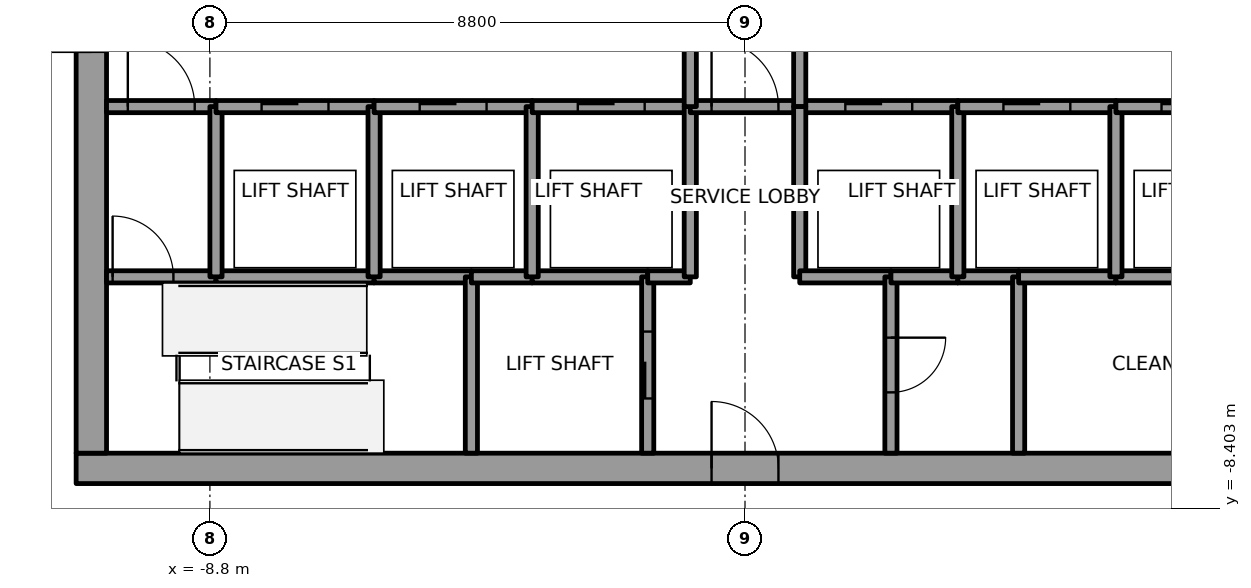
"""IFC4 building model, lengths in metres.
Left out: names, types, materials, properties, quantities, classifications, styles, units other than length and angle.
Written with IfcOpenShell. Run it as: python <this file> out.ifc"""

import sys

from ifc_helpers import new_model, si_unit, direction, frame, frame_2d, origin, place, context, subcontext, project, spatial, rectangle, extrude, element, fill, save


model = new_model("IFC4")
c1 = context("Model", 3, precision=1e-05, world=origin(), true_north=direction((0.0, 1.0)))
c2 = subcontext(c1, "Body", "Model", "MODEL_VIEW")
j1 = project(units=[si_unit("LENGTHUNIT", "METRE"), si_unit("PLANEANGLEUNIT", "RADIAN")], contexts=[c1])
p1 = place(None, origin())
s1 = spatial("IfcSite", under=j1, at=p1, CompositionType="ELEMENT")
p2 = place(p1, origin())
s2 = spatial("IfcBuilding", under=s1, at=p2, CompositionType="ELEMENT")
p3 = place(p2, frame((0.0, 0.0, 251.0)))
s3 = spatial("IfcBuildingStorey", under=s2, at=p3, CompositionType="ELEMENT", Elevation=251.0)
p4 = place(p3, frame((-11.0, -7.75, 0.0), z_axis=(0.0, 0.0, 1.0), x_axis=(1.0, 0.0, 0.0)))
e1 = element("IfcWall", 1, at=p4, inside=s3, PredefinedType="SHEAR", context=c2, shape_type="SweptSolid", body=[
    extrude(rectangle(XDim=22.0, YDim=0.5, at=frame_2d((11.0, 0.0))), origin(), (0.0, 0.0, 1.0), 4.0),
])
p5 = place(p4, frame((10.45, 0.0, 0.0)))
e2 = element("IfcOpeningElement", 2, at=p5, cuts=e1, PredefinedType="OPENING", context=c2, shape_type="SweptSolid", body=[
    extrude(rectangle(XDim=1.1, YDim=2.1, at=frame_2d((0.55, 1.05))), frame((0.0, 0.25, 0.0), z_axis=(0.0, -1.0, 0.0), x_axis=(1.0, 0.0, 0.0)), (0.0, 0.0, 1.0), 0.5),
])
p6 = place(p3, frame((-10.75, -7.5, 0.0), z_axis=(0.0, 0.0, 1.0), x_axis=(0.0, 1.0, 0.0)))
e3 = element("IfcWall", 3, at=p6, inside=s3, PredefinedType="SHEAR", context=c2, shape_type="SweptSolid", body=[
    extrude(rectangle(XDim=15.0, YDim=0.5, at=frame_2d((7.5, 0.0))), origin(), (0.0, 0.0, 1.0), 4.0),
])
p7 = place(p6, frame((6.6, 0.0, 0.0)))
e4 = element("IfcOpeningElement", 4, at=p7, cuts=e3, PredefinedType="OPENING", context=c2, shape_type="SweptSolid", body=[
    extrude(rectangle(XDim=1.8, YDim=2.1, at=frame_2d((0.9, 1.05))), frame((0.0, 0.25, 0.0), z_axis=(0.0, -1.0, 0.0), x_axis=(1.0, 0.0, 0.0)), (0.0, 0.0, 1.0), 0.5),
])
p8 = place(p3, frame((-10.5, -4.6, 0.0), z_axis=(0.0, 0.0, 1.0), x_axis=(1.0, 0.0, 0.0)))
e5 = element("IfcWall", 5, at=p8, inside=s3, PredefinedType="SOLIDWALL", context=c2, shape_type="SweptSolid", body=[
    extrude(rectangle(XDim=1.8, YDim=0.2, at=frame_2d((0.9, 0.0))), origin(), (0.0, 0.0, 1.0), 3.85),
])
p9 = place(p8, frame((0.1, 0.0, 0.0)))
e6 = element("IfcOpeningElement", 6, at=p9, cuts=e5, PredefinedType="OPENING", context=c2, shape_type="SweptSolid", body=[
    extrude(rectangle(XDim=1.0, YDim=2.1, at=frame_2d((0.5, 1.05))), frame((0.0, 0.1, 0.0), z_axis=(0.0, -1.0, 0.0), x_axis=(1.0, 0.0, 0.0)), (0.0, 0.0, 1.0), 0.2),
])
p10 = place(p3, frame((-10.5, -1.8, 0.0), z_axis=(0.0, 0.0, 1.0), x_axis=(1.0, 0.0, 0.0)))
e7 = element("IfcWall", 7, at=p10, inside=s3, PredefinedType="SOLIDWALL", context=c2, shape_type="SweptSolid", body=[
    extrude(rectangle(XDim=1.8, YDim=0.2, at=frame_2d((0.9, 0.0))), origin(), (0.0, 0.0, 1.0), 3.85),
])
p11 = place(p10, frame((0.35, 0.0, 0.0)))
e8 = element("IfcOpeningElement", 8, at=p11, cuts=e7, PredefinedType="OPENING", context=c2, shape_type="SweptSolid", body=[
    extrude(rectangle(XDim=1.1, YDim=2.1, at=frame_2d((0.55, 1.05))), frame((0.0, 0.1, 0.0), z_axis=(0.0, -1.0, 0.0), x_axis=(1.0, 0.0, 0.0)), (0.0, 0.0, 1.0), 0.2),
])
p12 = place(p3, frame((-8.7, -4.6, 0.0), z_axis=(0.0, 0.0, 1.0), x_axis=(1.0, 0.0, 0.0)))
e9 = element("IfcWall", 9, at=p12, inside=s3, PredefinedType="SOLIDWALL", context=c2, shape_type="SweptSolid", body=[
    extrude(rectangle(XDim=2.6, YDim=0.2, at=frame_2d((1.3, 0.0))), origin(), (0.0, 0.0, 1.0), 3.85),
])
p13 = place(p3, frame((-8.7, -4.6, 0.0), z_axis=(0.0, 0.0, 1.0), x_axis=(0.0, 1.0, 0.0)))
e10 = element("IfcWall", 10, at=p13, inside=s3, PredefinedType="SOLIDWALL", context=c2, shape_type="SweptSolid", body=[
    extrude(rectangle(XDim=2.8, YDim=0.2, at=frame_2d((1.4, 0.0))), origin(), (0.0, 0.0, 1.0), 3.85),
])
p14 = place(p3, frame((-8.7, -1.8, 0.0), z_axis=(0.0, 0.0, 1.0), x_axis=(1.0, 0.0, 0.0)))
e11 = element("IfcWall", 11, at=p14, inside=s3, PredefinedType="SOLIDWALL", context=c2, shape_type="SweptSolid", body=[
    extrude(rectangle(XDim=2.6, YDim=0.2, at=frame_2d((1.3, 0.0))), origin(), (0.0, 0.0, 1.0), 3.85),
])
p15 = place(p14, frame((0.75, 0.0, 0.0)))
e12 = element("IfcOpeningElement", 12, at=p15, cuts=e11, PredefinedType="OPENING", context=c2, shape_type="SweptSolid", body=[
    extrude(rectangle(XDim=1.1, YDim=2.1, at=frame_2d((0.55, 1.05))), frame((0.0, 0.1, 0.0), z_axis=(0.0, -1.0, 0.0), x_axis=(1.0, 0.0, 0.0)), (0.0, 0.0, 1.0), 0.2),
])
p16 = place(p3, frame((-6.1, -4.6, 0.0), z_axis=(0.0, 0.0, 1.0), x_axis=(1.0, 0.0, 0.0)))
e13 = element("IfcWall", 13, at=p16, inside=s3, PredefinedType="SOLIDWALL", context=c2, shape_type="SweptSolid", body=[
    extrude(rectangle(XDim=1.6, YDim=0.2, at=frame_2d((0.8, 0.0))), origin(), (0.0, 0.0, 1.0), 3.85),
])
p17 = place(p3, frame((-6.1, -4.6, 0.0), z_axis=(0.0, 0.0, 1.0), x_axis=(0.0, 1.0, 0.0)))
e14 = element("IfcWall", 14, at=p17, inside=s3, PredefinedType="SOLIDWALL", context=c2, shape_type="SweptSolid", body=[
    extrude(rectangle(XDim=2.8, YDim=0.2, at=frame_2d((1.4, 0.0))), origin(), (0.0, 0.0, 1.0), 3.85),
])
p18 = place(p3, frame((-6.1, -1.8, 0.0), z_axis=(0.0, 0.0, 1.0), x_axis=(1.0, 0.0, 0.0)))
e15 = element("IfcWall", 15, at=p18, inside=s3, PredefinedType="SOLIDWALL", context=c2, shape_type="SweptSolid", body=[
    extrude(rectangle(XDim=2.6, YDim=0.2, at=frame_2d((1.3, 0.0))), origin(), (0.0, 0.0, 1.0), 3.85),
])
p19 = place(p18, frame((0.75, 0.0, 0.0)))
e16 = element("IfcOpeningElement", 16, at=p19, cuts=e15, PredefinedType="OPENING", context=c2, shape_type="SweptSolid", body=[
    extrude(rectangle(XDim=1.1, YDim=2.1, at=frame_2d((0.55, 1.05))), frame((0.0, 0.1, 0.0), z_axis=(0.0, -1.0, 0.0), x_axis=(1.0, 0.0, 0.0)), (0.0, 0.0, 1.0), 0.2),
])
p20 = place(p3, frame((-4.5, -4.6, 0.0), z_axis=(0.0, 0.0, 1.0), x_axis=(0.0, -1.0, 0.0)))
e17 = element("IfcWall", 17, at=p20, inside=s3, PredefinedType="SOLIDWALL", context=c2, shape_type="SweptSolid", body=[
    extrude(rectangle(XDim=2.9, YDim=0.2, at=frame_2d((1.45, 0.0))), origin(), (0.0, 0.0, 1.0), 3.85),
])
p21 = place(p3, frame((-4.5, -4.6, 0.0), z_axis=(0.0, 0.0, 1.0), x_axis=(1.0, 0.0, 0.0)))
e18 = element("IfcWall", 18, at=p21, inside=s3, PredefinedType="SOLIDWALL", context=c2, shape_type="SweptSolid", body=[
    extrude(rectangle(XDim=1.0, YDim=0.2, at=frame_2d((0.5, 0.0))), origin(), (0.0, 0.0, 1.0), 3.85),
])
p22 = place(p3, frame((-3.5, -4.6, 0.0), z_axis=(0.0, 0.0, 1.0), x_axis=(1.0, 0.0, 0.0)))
e19 = element("IfcWall", 19, at=p22, inside=s3, PredefinedType="SOLIDWALL", context=c2, shape_type="SweptSolid", body=[
    extrude(rectangle(XDim=1.9, YDim=0.2, at=frame_2d((0.95, 0.0))), origin(), (0.0, 0.0, 1.0), 3.85),
])
p23 = place(p3, frame((-3.5, -4.6, 0.0), z_axis=(0.0, 0.0, 1.0), x_axis=(0.0, 1.0, 0.0)))
e20 = element("IfcWall", 20, at=p23, inside=s3, PredefinedType="SOLIDWALL", context=c2, shape_type="SweptSolid", body=[
    extrude(rectangle(XDim=2.8, YDim=0.2, at=frame_2d((1.4, 0.0))), origin(), (0.0, 0.0, 1.0), 3.85),
])
p24 = place(p3, frame((-3.5, -1.8, 0.0), z_axis=(0.0, 0.0, 1.0), x_axis=(1.0, 0.0, 0.0)))
e21 = element("IfcWall", 21, at=p24, inside=s3, PredefinedType="SOLIDWALL", context=c2, shape_type="SweptSolid", body=[
    extrude(rectangle(XDim=2.6, YDim=0.2, at=frame_2d((1.3, 0.0))), origin(), (0.0, 0.0, 1.0), 3.85),
])
p25 = place(p24, frame((0.75, 0.0, 0.0)))
e22 = element("IfcOpeningElement", 22, at=p25, cuts=e21, PredefinedType="OPENING", context=c2, shape_type="SweptSolid", body=[
    extrude(rectangle(XDim=1.1, YDim=2.1, at=frame_2d((0.55, 1.05))), frame((0.0, 0.1, 0.0), z_axis=(0.0, -1.0, 0.0), x_axis=(1.0, 0.0, 0.0)), (0.0, 0.0, 1.0), 0.2),
])
p26 = place(p3, frame((-1.6, -7.5, 0.0), z_axis=(0.0, 0.0, 1.0), x_axis=(0.0, 1.0, 0.0)))
e23 = element("IfcWall", 23, at=p26, inside=s3, PredefinedType="SOLIDWALL", context=c2, shape_type="SweptSolid", body=[
    extrude(rectangle(XDim=2.9, YDim=0.2, at=frame_2d((1.45, 0.0))), origin(), (0.0, 0.0, 1.0), 3.85),
])
p27 = place(p26, frame((0.9, 0.0, 0.0)))
e24 = element("IfcOpeningElement", 24, at=p27, cuts=e23, PredefinedType="OPENING", context=c2, shape_type="SweptSolid", body=[
    extrude(rectangle(XDim=1.1, YDim=2.1, at=frame_2d((0.55, 1.05))), frame((0.0, 0.1, 0.0), z_axis=(0.0, -1.0, 0.0), x_axis=(1.0, 0.0, 0.0)), (0.0, 0.0, 1.0), 0.2),
])
p28 = place(p3, frame((-1.6, -4.6, 0.0), z_axis=(0.0, 0.0, 1.0), x_axis=(1.0, 0.0, 0.0)))
e25 = element("IfcWall", 25, at=p28, inside=s3, PredefinedType="SOLIDWALL", context=c2, shape_type="SweptSolid", body=[
    extrude(rectangle(XDim=0.7, YDim=0.2, at=frame_2d((0.35, 0.0))), origin(), (0.0, 0.0, 1.0), 3.85),
])
p29 = place(p3, frame((-0.9, -4.6, 0.0), z_axis=(0.0, 0.0, 1.0), x_axis=(0.0, 1.0, 0.0)))
e26 = element("IfcWall", 26, at=p29, inside=s3, PredefinedType="SOLIDWALL", context=c2, shape_type="SweptSolid", body=[
    extrude(rectangle(XDim=2.8, YDim=0.2, at=frame_2d((1.4, 0.0))), origin(), (0.0, 0.0, 1.0), 3.85),
])
p30 = place(p3, frame((-0.9, -1.8, 0.0), z_axis=(0.0, 0.0, 1.0), x_axis=(1.0, 0.0, 0.0)))
e27 = element("IfcWall", 27, at=p30, inside=s3, PredefinedType="SOLIDWALL", context=c2, shape_type="SweptSolid", body=[
    extrude(rectangle(XDim=1.8, YDim=0.2, at=frame_2d((0.9, 0.0))), origin(), (0.0, 0.0, 1.0), 3.85),
])
p31 = place(p30, frame((0.35, 0.0, 0.0)))
e28 = element("IfcOpeningElement", 28, at=p31, cuts=e27, PredefinedType="OPENING", context=c2, shape_type="SweptSolid", body=[
    extrude(rectangle(XDim=1.1, YDim=2.1, at=frame_2d((0.55, 1.05))), frame((0.0, 0.1, 0.0), z_axis=(0.0, -1.0, 0.0), x_axis=(1.0, 0.0, 0.0)), (0.0, 0.0, 1.0), 0.2),
])
p32 = place(p3, frame((-0.9, 1.8, 0.0), z_axis=(0.0, 0.0, 1.0), x_axis=(0.0, -1.0, 0.0)))
e29 = element("IfcWall", 29, at=p32, inside=s3, PredefinedType="SOLIDWALL", context=c2, shape_type="SweptSolid", body=[
    extrude(rectangle(XDim=3.6, YDim=0.2, at=frame_2d((1.8, 0.0))), origin(), (0.0, 0.0, 1.0), 3.85),
])
p33 = place(p32, frame((1.05, 0.0, 0.0)))
e30 = element("IfcOpeningElement", 30, at=p33, cuts=e29, PredefinedType="OPENING", context=c2, shape_type="SweptSolid", body=[
    extrude(rectangle(XDim=1.5, YDim=2.1, at=frame_2d((0.75, 1.05))), frame((0.0, 0.1, 0.0), z_axis=(0.0, -1.0, 0.0), x_axis=(1.0, 0.0, 0.0)), (0.0, 0.0, 1.0), 0.2),
])
p34 = place(p3, frame((0.9, -1.8, 0.0), z_axis=(0.0, 0.0, 1.0), x_axis=(1.0, 0.0, 0.0)))
e31 = element("IfcWall", 31, at=p34, inside=s3, PredefinedType="SOLIDWALL", context=c2, shape_type="SweptSolid", body=[
    extrude(rectangle(XDim=2.6, YDim=0.2, at=frame_2d((1.3, 0.0))), origin(), (0.0, 0.0, 1.0), 3.85),
])
p35 = place(p34, frame((0.75, 0.0, 0.0)))
e32 = element("IfcOpeningElement", 32, at=p35, cuts=e31, PredefinedType="OPENING", context=c2, shape_type="SweptSolid", body=[
    extrude(rectangle(XDim=1.1, YDim=2.1, at=frame_2d((0.55, 1.05))), frame((0.0, 0.1, 0.0), z_axis=(0.0, -1.0, 0.0), x_axis=(1.0, 0.0, 0.0)), (0.0, 0.0, 1.0), 0.2),
])
p36 = place(p3, frame((0.9, -1.8, 0.0), z_axis=(0.0, 0.0, 1.0), x_axis=(0.0, 1.0, 0.0)))
e33 = element("IfcWall", 33, at=p36, inside=s3, PredefinedType="SOLIDWALL", context=c2, shape_type="SweptSolid", body=[
    extrude(rectangle(XDim=3.6, YDim=0.2, at=frame_2d((1.8, 0.0))), origin(), (0.0, 0.0, 1.0), 3.85),
])
p37 = place(p36, frame((1.05, 0.0, 0.0)))
e34 = element("IfcOpeningElement", 34, at=p37, cuts=e33, PredefinedType="OPENING", context=c2, shape_type="SweptSolid", body=[
    extrude(rectangle(XDim=1.5, YDim=2.1, at=frame_2d((0.75, 1.05))), frame((0.0, 0.1, 0.0), z_axis=(0.0, -1.0, 0.0), x_axis=(1.0, 0.0, 0.0)), (0.0, 0.0, 1.0), 0.2),
])
p38 = place(p3, frame((0.9, -1.8, 0.0), z_axis=(0.0, 0.0, 1.0), x_axis=(0.0, -1.0, 0.0)))
e35 = element("IfcWall", 35, at=p38, inside=s3, PredefinedType="SOLIDWALL", context=c2, shape_type="SweptSolid", body=[
    extrude(rectangle(XDim=2.8, YDim=0.2, at=frame_2d((1.4, 0.0))), origin(), (0.0, 0.0, 1.0), 3.85),
])
p39 = place(p3, frame((0.9, -4.6, 0.0), z_axis=(0.0, 0.0, 1.0), x_axis=(1.0, 0.0, 0.0)))
e36 = element("IfcWall", 36, at=p39, inside=s3, PredefinedType="SOLIDWALL", context=c2, shape_type="SweptSolid", body=[
    extrude(rectangle(XDim=1.5, YDim=0.2, at=frame_2d((0.75, 0.0))), origin(), (0.0, 0.0, 1.0), 3.85),
])
p40 = place(p3, frame((2.4, -4.6, 0.0), z_axis=(0.0, 0.0, 1.0), x_axis=(0.0, -1.0, 0.0)))
e37 = element("IfcWall", 37, at=p40, inside=s3, PredefinedType="SOLIDWALL", context=c2, shape_type="SweptSolid", body=[
    extrude(rectangle(XDim=2.9, YDim=0.2, at=frame_2d((1.45, 0.0))), origin(), (0.0, 0.0, 1.0), 3.85),
])
p41 = place(p40, frame((1.0, 0.0, 0.0)))
e38 = element("IfcOpeningElement", 38, at=p41, cuts=e37, PredefinedType="OPENING", context=c2, shape_type="SweptSolid", body=[
    extrude(rectangle(XDim=0.9, YDim=2.1, at=frame_2d((0.45, 1.05))), frame((0.0, 0.1, 0.0), z_axis=(0.0, -1.0, 0.0), x_axis=(1.0, 0.0, 0.0)), (0.0, 0.0, 1.0), 0.2),
])
p42 = place(p3, frame((3.5, -4.6, 0.0), z_axis=(0.0, 0.0, 1.0), x_axis=(-1.0, 0.0, 0.0)))
e39 = element("IfcWall", 39, at=p42, inside=s3, PredefinedType="SOLIDWALL", context=c2, shape_type="SweptSolid", body=[
    extrude(rectangle(XDim=1.1, YDim=0.2, at=frame_2d((0.55, 0.0))), origin(), (0.0, 0.0, 1.0), 3.85),
])
p43 = place(p3, frame((4.5, -4.6, 0.0), z_axis=(0.0, 0.0, 1.0), x_axis=(-1.0, 0.0, 0.0)))
e40 = element("IfcWall", 40, at=p43, inside=s3, PredefinedType="SOLIDWALL", context=c2, shape_type="SweptSolid", body=[
    extrude(rectangle(XDim=1.0, YDim=0.2, at=frame_2d((0.5, 0.0))), origin(), (0.0, 0.0, 1.0), 3.85),
])
p44 = place(p3, frame((3.5, -4.6, 0.0), z_axis=(0.0, 0.0, 1.0), x_axis=(0.0, 1.0, 0.0)))
e41 = element("IfcWall", 41, at=p44, inside=s3, PredefinedType="SOLIDWALL", context=c2, shape_type="SweptSolid", body=[
    extrude(rectangle(XDim=2.8, YDim=0.2, at=frame_2d((1.4, 0.0))), origin(), (0.0, 0.0, 1.0), 3.85),
])
p45 = place(p3, frame((3.5, -1.8, 0.0), z_axis=(0.0, 0.0, 1.0), x_axis=(1.0, 0.0, 0.0)))
e42 = element("IfcWall", 42, at=p45, inside=s3, PredefinedType="SOLIDWALL", context=c2, shape_type="SweptSolid", body=[
    extrude(rectangle(XDim=2.6, YDim=0.2, at=frame_2d((1.3, 0.0))), origin(), (0.0, 0.0, 1.0), 3.85),
])
p46 = place(p45, frame((0.75, 0.0, 0.0)))
e43 = element("IfcOpeningElement", 43, at=p46, cuts=e42, PredefinedType="OPENING", context=c2, shape_type="SweptSolid", body=[
    extrude(rectangle(XDim=1.1, YDim=2.1, at=frame_2d((0.55, 1.05))), frame((0.0, 0.1, 0.0), z_axis=(0.0, -1.0, 0.0), x_axis=(1.0, 0.0, 0.0)), (0.0, 0.0, 1.0), 0.2),
])
p47 = place(p3, frame((4.5, -4.6, 0.0), z_axis=(0.0, 0.0, 1.0), x_axis=(0.0, -1.0, 0.0)))
e44 = element("IfcWall", 44, at=p47, inside=s3, PredefinedType="SOLIDWALL", context=c2, shape_type="SweptSolid", body=[
    extrude(rectangle(XDim=2.9, YDim=0.2, at=frame_2d((1.45, 0.0))), origin(), (0.0, 0.0, 1.0), 3.85),
])
p48 = place(p3, frame((6.1, -4.6, 0.0), z_axis=(0.0, 0.0, 1.0), x_axis=(-1.0, 0.0, 0.0)))
e45 = element("IfcWall", 45, at=p48, inside=s3, PredefinedType="SOLIDWALL", context=c2, shape_type="SweptSolid", body=[
    extrude(rectangle(XDim=1.6, YDim=0.2, at=frame_2d((0.8, 0.0))), origin(), (0.0, 0.0, 1.0), 3.85),
])
p49 = place(p3, frame((8.7, -4.6, 0.0), z_axis=(0.0, 0.0, 1.0), x_axis=(-1.0, 0.0, 0.0)))
e46 = element("IfcWall", 46, at=p49, inside=s3, PredefinedType="SOLIDWALL", context=c2, shape_type="SweptSolid", body=[
    extrude(rectangle(XDim=2.6, YDim=0.2, at=frame_2d((1.3, 0.0))), origin(), (0.0, 0.0, 1.0), 3.85),
])
p50 = place(p3, frame((6.1, -4.6, 0.0), z_axis=(0.0, 0.0, 1.0), x_axis=(0.0, 1.0, 0.0)))
e47 = element("IfcWall", 47, at=p50, inside=s3, PredefinedType="SOLIDWALL", context=c2, shape_type="SweptSolid", body=[
    extrude(rectangle(XDim=2.8, YDim=0.2, at=frame_2d((1.4, 0.0))), origin(), (0.0, 0.0, 1.0), 3.85),
])
p51 = place(p3, frame((6.1, -1.8, 0.0), z_axis=(0.0, 0.0, 1.0), x_axis=(1.0, 0.0, 0.0)))
e48 = element("IfcWall", 48, at=p51, inside=s3, PredefinedType="SOLIDWALL", context=c2, shape_type="SweptSolid", body=[
    extrude(rectangle(XDim=2.6, YDim=0.2, at=frame_2d((1.3, 0.0))), origin(), (0.0, 0.0, 1.0), 3.85),
])
p52 = place(p51, frame((0.75, 0.0, 0.0)))
e49 = element("IfcOpeningElement", 49, at=p52, cuts=e48, PredefinedType="OPENING", context=c2, shape_type="SweptSolid", body=[
    extrude(rectangle(XDim=1.1, YDim=2.1, at=frame_2d((0.55, 1.05))), frame((0.0, 0.1, 0.0), z_axis=(0.0, -1.0, 0.0), x_axis=(1.0, 0.0, 0.0)), (0.0, 0.0, 1.0), 0.2),
])
p53 = place(p15, origin())
e50 = element("IfcDoor", 50, at=p53, inside=s3, OperationType="SLIDING_TO_RIGHT", PredefinedType="DOOR", context=c2, shape_type="SweptSolid", body=[
    extrude(rectangle(XDim=1.1, YDim=2.1, at=frame_2d((0.55, 1.05))), frame((0.0, 0.025, 0.0), z_axis=(0.0, -1.0, 0.0), x_axis=(1.0, 0.0, 0.0)), (0.0, 0.0, 1.0), 0.05),
])
fill(e12, e50)
p54 = place(p19, origin())
e51 = element("IfcDoor", 51, at=p54, inside=s3, OperationType="SLIDING_TO_LEFT", PredefinedType="DOOR", context=c2, shape_type="SweptSolid", body=[
    extrude(rectangle(XDim=1.1, YDim=2.1, at=frame_2d((0.55, 1.05))), frame((0.0, 0.025, 0.0), z_axis=(0.0, -1.0, 0.0), x_axis=(1.0, 0.0, 0.0)), (0.0, 0.0, 1.0), 0.05),
])
fill(e16, e51)
p55 = place(p25, origin())
e52 = element("IfcDoor", 52, at=p55, inside=s3, OperationType="SLIDING_TO_LEFT", PredefinedType="DOOR", context=c2, shape_type="SweptSolid", body=[
    extrude(rectangle(XDim=1.1, YDim=2.1, at=frame_2d((0.55, 1.05))), frame((0.0, 0.025, 0.0), z_axis=(0.0, -1.0, 0.0), x_axis=(1.0, 0.0, 0.0)), (0.0, 0.0, 1.0), 0.05),
])
fill(e22, e52)
p56 = place(p35, origin())
e53 = element("IfcDoor", 53, at=p56, inside=s3, OperationType="SLIDING_TO_RIGHT", PredefinedType="DOOR", context=c2, shape_type="SweptSolid", body=[
    extrude(rectangle(XDim=1.1, YDim=2.1, at=frame_2d((0.55, 1.05))), frame((0.0, 0.025, 0.0), z_axis=(0.0, -1.0, 0.0), x_axis=(1.0, 0.0, 0.0)), (0.0, 0.0, 1.0), 0.05),
])
fill(e32, e53)
p57 = place(p46, origin())
e54 = element("IfcDoor", 54, at=p57, inside=s3, OperationType="SLIDING_TO_LEFT", PredefinedType="DOOR", context=c2, shape_type="SweptSolid", body=[
    extrude(rectangle(XDim=1.1, YDim=2.1, at=frame_2d((0.55, 1.05))), frame((0.0, 0.025, 0.0), z_axis=(0.0, -1.0, 0.0), x_axis=(1.0, 0.0, 0.0)), (0.0, 0.0, 1.0), 0.05),
])
fill(e43, e54)
p58 = place(p52, origin())
e55 = element("IfcDoor", 55, at=p58, inside=s3, OperationType="SLIDING_TO_RIGHT", PredefinedType="DOOR", context=c2, shape_type="SweptSolid", body=[
    extrude(rectangle(XDim=1.1, YDim=2.1, at=frame_2d((0.55, 1.05))), frame((0.0, 0.025, 0.0), z_axis=(0.0, -1.0, 0.0), x_axis=(1.0, 0.0, 0.0)), (0.0, 0.0, 1.0), 0.05),
])
fill(e49, e55)
p59 = place(p27, origin())
e56 = element("IfcDoor", 56, at=p59, inside=s3, OperationType="SLIDING_TO_LEFT", PredefinedType="DOOR", context=c2, shape_type="SweptSolid", body=[
    extrude(rectangle(XDim=1.1, YDim=2.1, at=frame_2d((0.55, 1.05))), frame((0.0, 0.025, 0.0), z_axis=(0.0, -1.0, 0.0), x_axis=(1.0, 0.0, 0.0)), (0.0, 0.0, 1.0), 0.05),
])
fill(e24, e56)
p60 = place(p11, origin())
e57 = element("IfcDoor", 57, at=p60, inside=s3, OperationType="SINGLE_SWING_LEFT", PredefinedType="DOOR", context=c2, shape_type="SweptSolid", body=[
    extrude(rectangle(XDim=1.1, YDim=2.1, at=frame_2d((0.55, 1.05))), frame((0.0, 0.025, 0.0), z_axis=(0.0, -1.0, 0.0), x_axis=(1.0, 0.0, 0.0)), (0.0, 0.0, 1.0), 0.05),
])
fill(e8, e57)
p61 = place(p31, origin())
e58 = element("IfcDoor", 58, at=p61, inside=s3, OperationType="SINGLE_SWING_LEFT", PredefinedType="DOOR", context=c2, shape_type="SweptSolid", body=[
    extrude(rectangle(XDim=1.1, YDim=2.1, at=frame_2d((0.55, 1.05))), frame((0.0, 0.025, 0.0), z_axis=(0.0, -1.0, 0.0), x_axis=(1.0, 0.0, 0.0)), (0.0, 0.0, 1.0), 0.05),
])
fill(e28, e58)
p62 = place(p9, origin())
e59 = element("IfcDoor", 59, at=p62, inside=s3, OperationType="SINGLE_SWING_LEFT", PredefinedType="DOOR", context=c2, shape_type="SweptSolid", body=[
    extrude(rectangle(XDim=1.0, YDim=2.1, at=frame_2d((0.5, 1.05))), frame((0.0, 0.025, 0.0), z_axis=(0.0, -1.0, 0.0), x_axis=(1.0, 0.0, 0.0)), (0.0, 0.0, 1.0), 0.05),
])
fill(e6, e59)
p63 = place(p41, origin())
e60 = element("IfcDoor", 60, at=p63, inside=s3, OperationType="SINGLE_SWING_RIGHT", PredefinedType="DOOR", context=c2, shape_type="SweptSolid", body=[
    extrude(rectangle(XDim=0.9, YDim=2.1, at=frame_2d((0.45, 1.05))), frame((0.0, 0.025, 0.0), z_axis=(0.0, -1.0, 0.0), x_axis=(1.0, 0.0, 0.0)), (0.0, 0.0, 1.0), 0.05),
])
fill(e38, e60)
p64 = place(p7, origin())
e61 = element("IfcDoor", 61, at=p64, inside=s3, OperationType="DOUBLE_DOOR_SINGLE_SWING", PredefinedType="DOOR", context=c2, shape_type="SweptSolid", body=[
    extrude(rectangle(XDim=1.8, YDim=2.1, at=frame_2d((0.9, 1.05))), frame((0.0, 0.025, 0.0), z_axis=(0.0, -1.0, 0.0), x_axis=(1.0, 0.0, 0.0)), (0.0, 0.0, 1.0), 0.05),
])
fill(e4, e61)
p65 = place(p5, origin())
e62 = element("IfcDoor", 62, at=p65, inside=s3, OperationType="SINGLE_SWING_LEFT", PredefinedType="DOOR", context=c2, shape_type="SweptSolid", body=[
    extrude(rectangle(XDim=1.1, YDim=2.1, at=frame_2d((0.55, 1.05))), frame((0.0, 0.025, 0.0), z_axis=(0.0, -1.0, 0.0), x_axis=(1.0, 0.0, 0.0)), (0.0, 0.0, 1.0), 0.05),
])
fill(e2, e62)
save(model, sys.argv[1])
